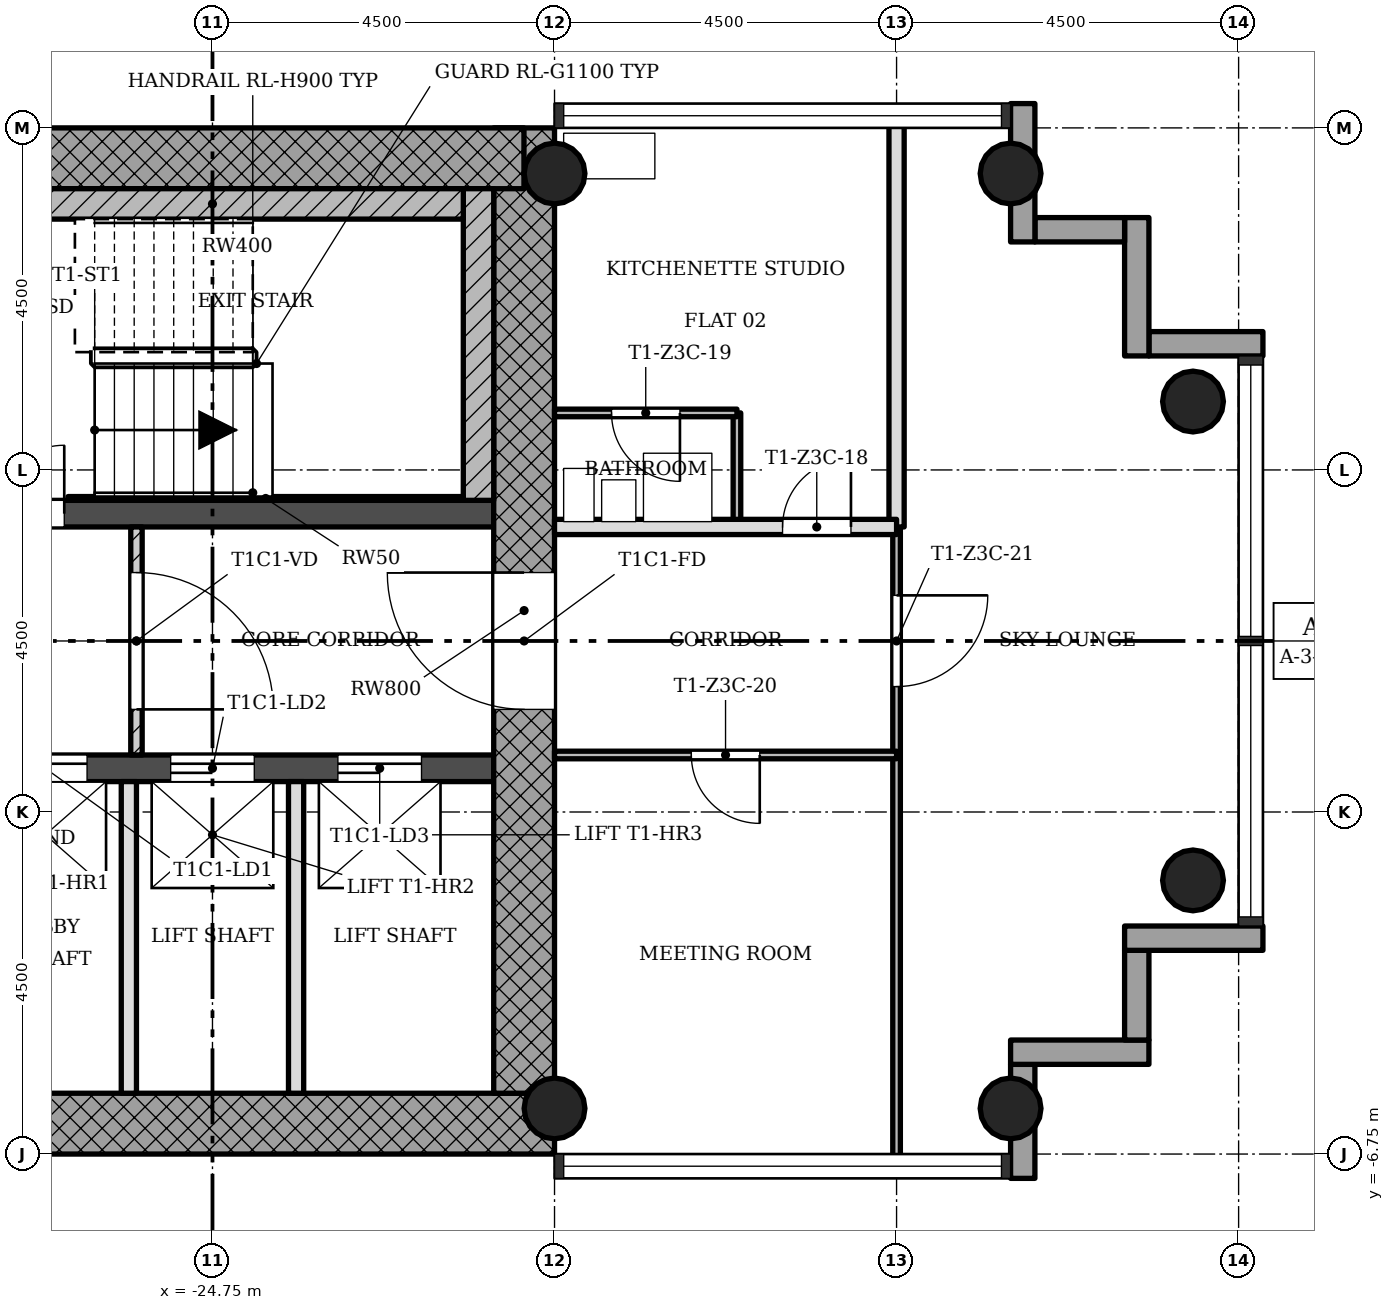
"""IFC4 building model, lengths in metres.
Left out: names, types, materials, properties, quantities, classifications, styles, units other than length and angle.
Written with IfcOpenShell. Run it as: python <this file> out.ifc"""

import sys

from ifc_helpers import new_model, si_unit, direction, frame, frame_2d, origin, origin_2d, place, context, subcontext, project, spatial, rectangle, hollow_circle, extrude, element, fill, save


model = new_model("IFC4")
c1 = context("Model", 3, precision=1e-05, world=origin(), true_north=direction((0.0, 1.0)))
c2 = subcontext(c1, "Body", "Model", "MODEL_VIEW")
j1 = project(units=[si_unit("LENGTHUNIT", "METRE"), si_unit("PLANEANGLEUNIT", "RADIAN")], contexts=[c1])
p1 = place(None, origin())
s1 = spatial("IfcSite", under=j1, at=p1, CompositionType="ELEMENT")
p2 = place(p1, origin())
s2 = spatial("IfcBuilding", under=s1, at=p2, CompositionType="ELEMENT")
p3 = place(p2, frame((0.0, 0.0, 154.1)))
s3 = spatial("IfcBuildingStorey", under=s2, at=p3, CompositionType="ELEMENT", Elevation=154.1)
p4 = place(p3, frame((-28.45, -6.35, 0.0), z_axis=(0.0, 0.0, 1.0), x_axis=(1.0, 0.0, 0.0)))
e1 = element("IfcWall", 1, at=p4, inside=s3, PredefinedType="SHEAR", context=c2, shape_type="SweptSolid", body=[
    extrude(rectangle(XDim=8.2, YDim=0.8, at=frame_2d((4.1, 0.0))), origin(), (0.0, 0.0, 1.0), 3.4),
])
p5 = place(p3, frame((-20.65, -5.95, 0.0), z_axis=(0.0, 0.0, 1.0), x_axis=(0.0, 1.0, 0.0)))
e2 = element("IfcWall", 2, at=p5, inside=s3, PredefinedType="SHEAR", context=c2, shape_type="SweptSolid", body=[
    extrude(rectangle(XDim=12.7, YDim=0.8, at=frame_2d((6.35, 0.0))), origin(), (0.0, 0.0, 1.0), 3.4),
])
p6 = place(p5, frame((5.05, 0.0, 0.0)))
e3 = element("IfcOpeningElement", 3, at=p6, cuts=e2, PredefinedType="OPENING", context=c2, shape_type="SweptSolid", body=[
    extrude(rectangle(XDim=1.8, YDim=2.1, at=frame_2d((0.9, 1.05))), frame((0.0, 0.41, 0.0), z_axis=(0.0, -1.0, 0.0), x_axis=(1.0, 0.0, 0.0)), (0.0, 0.0, 1.0), 0.82),
])
p7 = place(p3, frame((-20.652, 6.35, 0.0), z_axis=(0.0, 0.0, 1.0), x_axis=(-1.0, 0.0, 0.0)))
e4 = element("IfcWall", 4, at=p7, inside=s3, PredefinedType="SHEAR", context=c2, shape_type="SweptSolid", body=[
    extrude(rectangle(XDim=8.796, YDim=0.8, at=frame_2d((4.398, 0.0))), origin(), (0.0, 0.0, 1.0), 3.4),
])
p8 = place(p3, frame((-28.45, -1.675, 0.0), z_axis=(0.0, 0.0, 1.0), x_axis=(1.0, 0.0, 0.0)))
e5 = element("IfcWall", 5, at=p8, inside=s3, PredefinedType="SHEAR", context=c2, shape_type="SweptSolid", body=[
    extrude(rectangle(XDim=7.4, YDim=0.35, at=frame_2d((3.7, 0.0))), origin(), (0.0, 0.0, 1.0), 3.4),
])
p9 = place(p8, frame((0.95, 0.0, 0.0)))
e6 = element("IfcOpeningElement", 6, at=p9, cuts=e5, PredefinedType="OPENING", context=c2, shape_type="SweptSolid", body=[
    extrude(rectangle(XDim=1.1, YDim=2.1, at=frame_2d((0.55, 1.05))), frame((0.0, 0.185, 0.0), z_axis=(0.0, -1.0, 0.0), x_axis=(1.0, 0.0, 0.0)), (0.0, 0.0, 1.0), 0.37),
])
p10 = place(p8, frame((3.15, 0.0, 0.0)))
e7 = element("IfcOpeningElement", 7, at=p10, cuts=e5, PredefinedType="OPENING", context=c2, shape_type="SweptSolid", body=[
    extrude(rectangle(XDim=1.1, YDim=2.1, at=frame_2d((0.55, 1.05))), frame((0.0, 0.185, 0.0), z_axis=(0.0, -1.0, 0.0), x_axis=(1.0, 0.0, 0.0)), (0.0, 0.0, 1.0), 0.37),
])
p11 = place(p8, frame((5.35, 0.0, 0.0)))
e8 = element("IfcOpeningElement", 8, at=p11, cuts=e5, PredefinedType="OPENING", context=c2, shape_type="SweptSolid", body=[
    extrude(rectangle(XDim=1.1, YDim=2.1, at=frame_2d((0.55, 1.05))), frame((0.0, 0.185, 0.0), z_axis=(0.0, -1.0, 0.0), x_axis=(1.0, 0.0, 0.0)), (0.0, 0.0, 1.0), 0.37),
])
p12 = place(p3, frame((-28.45, 1.675, 0.0), z_axis=(0.0, 0.0, 1.0), x_axis=(1.0, 0.0, 0.0)))
e9 = element("IfcWall", 9, at=p12, inside=s3, PredefinedType="SHEAR", context=c2, shape_type="SweptSolid", body=[
    extrude(rectangle(XDim=7.4, YDim=0.35, at=frame_2d((3.7, 0.0))), origin(), (0.0, 0.0, 1.0), 3.4),
])
p13 = place(p12, frame((0.85, 0.0, 0.0)))
e10 = element("IfcOpeningElement", 10, at=p13, cuts=e9, PredefinedType="OPENING", context=c2, shape_type="SweptSolid", body=[
    extrude(rectangle(XDim=0.9, YDim=2.1, at=frame_2d((0.45, 1.05))), frame((0.0, 0.185, 0.0), z_axis=(0.0, -1.0, 0.0), x_axis=(1.0, 0.0, 0.0)), (0.0, 0.0, 1.0), 0.37),
])
for number, where, z_axis, x_axis in (
    (11, (-20.25, -6.15, 0.0), (0.0, 0.0, 1.0), (1.0, 0.0, 0.0)),
    (12, (-20.25, 6.15, 0.0), (0.0, 0.0, 1.0), (1.0, 0.0, 0.0)),
    (13, (-14.25, -6.15, 0.0), (0.0, 0.0, 1.0), (1.0, 0.0, 0.0)),
    (14, (-14.25, 6.15, 0.0), (0.0, 0.0, 1.0), (1.0, 0.0, 0.0)),
    (15, (-11.85, -3.15, 0.0), (0.0, 0.0, 1.0), (1.0, 0.0, 0.0)),
    (16, (-11.85, 3.15, 0.0), (0.0, 0.0, 1.0), (1.0, 0.0, 0.0)),
):
    element("IfcColumn", number, at=place(p3, frame(where, z_axis=z_axis, x_axis=x_axis)), inside=s3, PredefinedType="COLUMN", context=c2, shape_type="SweptSolid", body=[
        extrude(hollow_circle(Radius=0.4, WallThickness=0.028, at=origin_2d()), origin(), (0.0, 0.0, 1.0), 3.4),
    ])
p14 = place(p3, frame((-14.09, -7.07, -0.3), z_axis=(0.0, 0.0, 1.0), x_axis=(0.0, 1.0, 0.0)))
e17 = element("IfcWall", 17, at=p14, inside=s3, PredefinedType="STANDARD", context=c2, shape_type="SweptSolid", body=[
    extrude(rectangle(XDim=1.5, YDim=0.32, at=frame_2d((0.75, 0.0))), origin(), (0.0, 0.0, 1.0), 3.4),
])
p15 = place(p3, frame((-14.25, -5.41, -0.3), z_axis=(0.0, 0.0, 1.0), x_axis=(1.0, 0.0, 0.0)))
e18 = element("IfcWall", 18, at=p15, inside=s3, PredefinedType="STANDARD", context=c2, shape_type="SweptSolid", body=[
    extrude(rectangle(XDim=1.82, YDim=0.32, at=frame_2d((0.91, 0.0))), origin(), (0.0, 0.0, 1.0), 3.4),
])
p16 = place(p3, frame((-12.59, -5.25, -0.3), z_axis=(0.0, 0.0, 1.0), x_axis=(0.0, 1.0, 0.0)))
e19 = element("IfcWall", 19, at=p16, inside=s3, PredefinedType="STANDARD", context=c2, shape_type="SweptSolid", body=[
    extrude(rectangle(XDim=1.18, YDim=0.32, at=frame_2d((0.59, 0.0))), origin(), (0.0, 0.0, 1.0), 3.4),
])
p17 = place(p3, frame((-12.75, -3.91, -0.3), z_axis=(0.0, 0.0, 1.0), x_axis=(1.0, 0.0, 0.0)))
e20 = element("IfcWall", 20, at=p17, inside=s3, PredefinedType="STANDARD", context=c2, shape_type="SweptSolid", body=[
    extrude(rectangle(XDim=1.82, YDim=0.32, at=frame_2d((0.91, 0.0))), origin(), (0.0, 0.0, 1.0), 3.4),
])
p18 = place(p3, frame((-10.93, 3.91, -0.3), z_axis=(0.0, 0.0, 1.0), x_axis=(-1.0, 0.0, 0.0)))
e21 = element("IfcWall", 21, at=p18, inside=s3, PredefinedType="STANDARD", context=c2, shape_type="SweptSolid", body=[
    extrude(rectangle(XDim=1.5, YDim=0.32, at=frame_2d((0.75, 0.0))), origin(), (0.0, 0.0, 1.0), 3.4),
])
p19 = place(p3, frame((-12.59, 3.75, -0.3), z_axis=(0.0, 0.0, 1.0), x_axis=(0.0, 1.0, 0.0)))
e22 = element("IfcWall", 22, at=p19, inside=s3, PredefinedType="STANDARD", context=c2, shape_type="SweptSolid", body=[
    extrude(rectangle(XDim=1.82, YDim=0.32, at=frame_2d((0.91, 0.0))), origin(), (0.0, 0.0, 1.0), 3.4),
])
p20 = place(p3, frame((-12.75, 5.41, -0.3), z_axis=(0.0, 0.0, 1.0), x_axis=(-1.0, 0.0, 0.0)))
e23 = element("IfcWall", 23, at=p20, inside=s3, PredefinedType="STANDARD", context=c2, shape_type="SweptSolid", body=[
    extrude(rectangle(XDim=1.18, YDim=0.32, at=frame_2d((0.59, 0.0))), origin(), (0.0, 0.0, 1.0), 3.4),
])
p21 = place(p3, frame((-14.09, 5.25, -0.3), z_axis=(0.0, 0.0, 1.0), x_axis=(0.0, 1.0, 0.0)))
e24 = element("IfcWall", 24, at=p21, inside=s3, PredefinedType="STANDARD", context=c2, shape_type="SweptSolid", body=[
    extrude(rectangle(XDim=1.82, YDim=0.32, at=frame_2d((0.91, 0.0))), origin(), (0.0, 0.0, 1.0), 3.4),
])
p22 = place(p3, frame((-25.75, -1.5, 0.0), z_axis=(0.0, 0.0, 1.0), x_axis=(0.0, 1.0, 0.0)))
e25 = element("IfcWall", 25, at=p22, inside=s3, PredefinedType="PARTITIONING", context=c2, shape_type="SweptSolid", body=[
    extrude(rectangle(XDim=3.0, YDim=0.15, at=frame_2d((1.5, 0.0))), origin(), (0.0, 0.0, 1.0), 3.0),
])
p23 = place(p22, frame((0.6, 0.0, 0.0)))
e26 = element("IfcOpeningElement", 26, at=p23, cuts=e25, PredefinedType="OPENING", context=c2, shape_type="SweptSolid", body=[
    extrude(rectangle(XDim=1.8, YDim=2.1, at=frame_2d((0.9, 1.05))), frame((0.0, 0.085, 0.0), z_axis=(0.0, -1.0, 0.0), x_axis=(1.0, 0.0, 0.0)), (0.0, 0.0, 1.0), 0.17),
])
for number, where, z_axis, x_axis in (
    (27, (-25.85, -5.95, 0.0), (0.0, 0.0, 1.0), (0.0, 1.0, 0.0)),
    (28, (-23.65, -5.95, 0.0), (0.0, 0.0, 1.0), (0.0, 1.0, 0.0)),
):
    element("IfcWall", number, at=place(p3, frame(where, z_axis=z_axis, x_axis=x_axis)), inside=s3, PredefinedType="SOLIDWALL", context=c2, shape_type="SweptSolid", body=[
        extrude(rectangle(XDim=4.1, YDim=0.2, at=frame_2d((2.05, 0.0))), origin(), (0.0, 0.0, 1.0), 3.0),
    ])
p24 = place(p3, frame((-17.85, 1.5, 0.0), z_axis=(0.0, 0.0, 1.0), x_axis=(0.0, 1.0, 0.0)))
e29 = element("IfcWall", 29, at=p24, inside=s3, PredefinedType="PARTITIONING", context=c2, shape_type="SweptSolid", body=[
    extrude(rectangle(XDim=1.5, YDim=0.1, at=frame_2d((0.75, 0.0))), origin(), (0.0, 0.0, 1.0), 3.0),
])
p25 = place(p3, frame((-15.75, -6.85, 0.0), z_axis=(0.0, 0.0, 1.0), x_axis=(0.0, 1.0, 0.0)))
e30 = element("IfcWall", 30, at=p25, inside=s3, PredefinedType="PARTITIONING", context=c2, shape_type="SweptSolid", body=[
    extrude(rectangle(XDim=8.35, YDim=0.1, at=frame_2d((4.175, 0.0))), origin(), (0.0, 0.0, 1.0), 3.0),
])
p26 = place(p25, frame((6.25, 0.0, 0.0)))
e31 = element("IfcOpeningElement", 31, at=p26, cuts=e30, PredefinedType="OPENING", context=c2, shape_type="SweptSolid", body=[
    extrude(rectangle(XDim=1.2, YDim=2.1, at=frame_2d((0.6, 1.05))), frame((0.0, 0.06, 0.0), z_axis=(0.0, -1.0, 0.0), x_axis=(1.0, 0.0, 0.0)), (0.0, 0.0, 1.0), 0.12),
])
p27 = place(p3, frame((-15.75, 1.5, 0.0), z_axis=(0.0, 0.0, 1.0), x_axis=(0.0, 1.0, 0.0)))
e32 = element("IfcWall", 32, at=p27, inside=s3, PredefinedType="SOLIDWALL", context=c2, shape_type="SweptSolid", body=[
    extrude(rectangle(XDim=5.35, YDim=0.2, at=frame_2d((2.675, 0.0))), origin(), (0.0, 0.0, 1.0), 3.0),
])
p28 = place(p3, frame((-20.25, -1.5, 0.0), z_axis=(0.0, 0.0, 1.0), x_axis=(1.0, 0.0, 0.0)))
e33 = element("IfcWall", 33, at=p28, inside=s3, PredefinedType="PARTITIONING", context=c2, shape_type="SweptSolid", body=[
    extrude(rectangle(XDim=4.5, YDim=0.1, at=frame_2d((2.25, 0.0))), origin(), (0.0, 0.0, 1.0), 3.0),
])
p29 = place(p28, frame((1.8, 0.0, 0.0)))
e34 = element("IfcOpeningElement", 34, at=p29, cuts=e33, PredefinedType="OPENING", context=c2, shape_type="SweptSolid", body=[
    extrude(rectangle(XDim=0.9, YDim=2.1, at=frame_2d((0.45, 1.05))), frame((0.0, 0.06, 0.0), z_axis=(0.0, -1.0, 0.0), x_axis=(1.0, 0.0, 0.0)), (0.0, 0.0, 1.0), 0.12),
])
p30 = place(p3, frame((-20.25, 1.5, 0.0), z_axis=(0.0, 0.0, 1.0), x_axis=(1.0, 0.0, 0.0)))
e35 = element("IfcWall", 35, at=p30, inside=s3, PredefinedType="SOLIDWALL", context=c2, shape_type="SweptSolid", body=[
    extrude(rectangle(XDim=4.5, YDim=0.2, at=frame_2d((2.25, 0.0))), origin(), (0.0, 0.0, 1.0), 3.0),
])
p31 = place(p30, frame((3.0, 0.0, 0.0)))
e36 = element("IfcOpeningElement", 36, at=p31, cuts=e35, PredefinedType="OPENING", context=c2, shape_type="SweptSolid", body=[
    extrude(rectangle(XDim=0.9, YDim=2.1, at=frame_2d((0.45, 1.05))), frame((0.0, 0.11, 0.0), z_axis=(0.0, -1.0, 0.0), x_axis=(1.0, 0.0, 0.0)), (0.0, 0.0, 1.0), 0.22),
])
p32 = place(p3, frame((-20.25, 3.0, 0.0), z_axis=(0.0, 0.0, 1.0), x_axis=(1.0, 0.0, 0.0)))
e37 = element("IfcWall", 37, at=p32, inside=s3, PredefinedType="PARTITIONING", context=c2, shape_type="SweptSolid", body=[
    extrude(rectangle(XDim=2.4, YDim=0.1, at=frame_2d((1.2, 0.0))), origin(), (0.0, 0.0, 1.0), 3.0),
])
p33 = place(p32, frame((0.75, 0.0, 0.0)))
e38 = element("IfcOpeningElement", 38, at=p33, cuts=e37, PredefinedType="OPENING", context=c2, shape_type="SweptSolid", body=[
    extrude(rectangle(XDim=0.9, YDim=2.1, at=frame_2d((0.45, 1.05))), frame((0.0, 0.06, 0.0), z_axis=(0.0, -1.0, 0.0), x_axis=(1.0, 0.0, 0.0)), (0.0, 0.0, 1.0), 0.12),
])
p34 = place(p3, frame((-21.25, 1.85, 0.0), z_axis=(0.0, 0.0, 1.0), x_axis=(0.0, 1.0, 0.0)))
e39 = element("IfcWall", 39, at=p34, inside=s3, PredefinedType="SHEAR", context=c2, shape_type="SweptSolid", body=[
    extrude(rectangle(XDim=4.1, YDim=0.4, at=frame_2d((2.05, 0.0))), origin(), (0.0, 0.0, 1.0), 3.4),
])
p35 = place(p3, frame((-28.05, 5.75, 0.0), z_axis=(0.0, 0.0, 1.0), x_axis=(1.0, 0.0, 0.0)))
e40 = element("IfcWall", 40, at=p35, inside=s3, PredefinedType="SHEAR", context=c2, shape_type="SweptSolid", body=[
    extrude(rectangle(XDim=6.6, YDim=0.4, at=frame_2d((3.3, 0.0))), origin(), (0.0, 0.0, 1.0), 3.4),
])
p36 = place(p3, frame((-26.65, 1.875, 0.0), z_axis=(0.0, 0.0, 1.0), x_axis=(1.0, 0.0, 0.0)))
e41 = element("IfcWall", 41, at=p36, inside=s3, PredefinedType="SHEAR", context=c2, shape_type="SweptSolid", body=[
    extrude(rectangle(XDim=5.2, YDim=0.05, at=frame_2d((2.6, 0.0))), origin(), (0.0, 0.0, 1.0), 3.4),
])
p37 = place(p23, origin())
e42 = element("IfcDoor", 42, at=p37, inside=s3, OperationType="SINGLE_SWING_LEFT", PredefinedType="DOOR", context=c2, shape_type="SweptSolid", body=[
    extrude(rectangle(XDim=1.8, YDim=2.1, at=frame_2d((0.9, 1.05))), frame((0.0, 0.025, 0.0), z_axis=(0.0, -1.0, 0.0), x_axis=(1.0, 0.0, 0.0)), (0.0, 0.0, 1.0), 0.05),
])
fill(e26, e42)
p38 = place(p31, origin())
e43 = element("IfcDoor", 43, at=p38, inside=s3, OperationType="SINGLE_SWING_LEFT", PredefinedType="DOOR", context=c2, shape_type="SweptSolid", body=[
    extrude(rectangle(XDim=0.9, YDim=2.1, at=frame_2d((0.45, 1.05))), frame((0.0, 0.025, 0.0), z_axis=(0.0, -1.0, 0.0), x_axis=(1.0, 0.0, 0.0)), (0.0, 0.0, 1.0), 0.05),
])
fill(e36, e43)
p39 = place(p33, origin())
e44 = element("IfcDoor", 44, at=p39, inside=s3, OperationType="SINGLE_SWING_RIGHT", PredefinedType="DOOR", context=c2, shape_type="SweptSolid", body=[
    extrude(rectangle(XDim=0.9, YDim=2.1, at=frame_2d((0.45, 1.05))), frame((0.0, 0.025, 0.0), z_axis=(0.0, -1.0, 0.0), x_axis=(1.0, 0.0, 0.0)), (0.0, 0.0, 1.0), 0.05),
])
fill(e38, e44)
p40 = place(p29, origin())
e45 = element("IfcDoor", 45, at=p40, inside=s3, OperationType="SINGLE_SWING_RIGHT", PredefinedType="DOOR", context=c2, shape_type="SweptSolid", body=[
    extrude(rectangle(XDim=0.9, YDim=2.1, at=frame_2d((0.45, 1.05))), frame((0.0, 0.025, 0.0), z_axis=(0.0, -1.0, 0.0), x_axis=(1.0, 0.0, 0.0)), (0.0, 0.0, 1.0), 0.05),
])
fill(e34, e45)
p41 = place(p26, origin())
e46 = element("IfcDoor", 46, at=p41, inside=s3, OperationType="SINGLE_SWING_RIGHT", PredefinedType="DOOR", context=c2, shape_type="SweptSolid", body=[
    extrude(rectangle(XDim=1.2, YDim=2.1, at=frame_2d((0.6, 1.05))), frame((0.0, 0.025, 0.0), z_axis=(0.0, -1.0, 0.0), x_axis=(1.0, 0.0, 0.0)), (0.0, 0.0, 1.0), 0.05),
])
fill(e31, e46)
p42 = place(p13, origin())
e47 = element("IfcDoor", 47, at=p42, inside=s3, OperationType="SINGLE_SWING_LEFT", PredefinedType="DOOR", context=c2, shape_type="SweptSolid", body=[
    extrude(rectangle(XDim=0.9, YDim=2.1, at=frame_2d((0.45, 1.05))), frame((0.0, 0.025, 0.0), z_axis=(0.0, -1.0, 0.0), x_axis=(1.0, 0.0, 0.0)), (0.0, 0.0, 1.0), 0.05),
])
fill(e10, e47)
p43 = place(p9, origin())
e48 = element("IfcDoor", 48, at=p43, inside=s3, OperationType="SLIDING_TO_LEFT", PredefinedType="DOOR", context=c2, shape_type="SweptSolid", body=[
    extrude(rectangle(XDim=1.1, YDim=2.1, at=frame_2d((0.55, 1.05))), frame((0.0, 0.025, 0.0), z_axis=(0.0, -1.0, 0.0), x_axis=(1.0, 0.0, 0.0)), (0.0, 0.0, 1.0), 0.05),
])
fill(e6, e48)
p44 = place(p10, origin())
e49 = element("IfcDoor", 49, at=p44, inside=s3, OperationType="SLIDING_TO_LEFT", PredefinedType="DOOR", context=c2, shape_type="SweptSolid", body=[
    extrude(rectangle(XDim=1.1, YDim=2.1, at=frame_2d((0.55, 1.05))), frame((0.0, 0.025, 0.0), z_axis=(0.0, -1.0, 0.0), x_axis=(1.0, 0.0, 0.0)), (0.0, 0.0, 1.0), 0.05),
])
fill(e7, e49)
p45 = place(p11, origin())
e50 = element("IfcDoor", 50, at=p45, inside=s3, OperationType="SLIDING_TO_LEFT", PredefinedType="DOOR", context=c2, shape_type="SweptSolid", body=[
    extrude(rectangle(XDim=1.1, YDim=2.1, at=frame_2d((0.55, 1.05))), frame((0.0, 0.025, 0.0), z_axis=(0.0, -1.0, 0.0), x_axis=(1.0, 0.0, 0.0)), (0.0, 0.0, 1.0), 0.05),
])
fill(e8, e50)
p46 = place(p6, origin())
e51 = element("IfcDoor", 51, at=p46, inside=s3, OperationType="SINGLE_SWING_LEFT", PredefinedType="DOOR", context=c2, shape_type="SweptSolid", body=[
    extrude(rectangle(XDim=1.8, YDim=2.1, at=frame_2d((0.9, 1.05))), frame((0.0, 0.025, 0.0), z_axis=(0.0, -1.0, 0.0), x_axis=(1.0, 0.0, 0.0)), (0.0, 0.0, 1.0), 0.05),
])
fill(e3, e51)
save(model, sys.argv[1])
